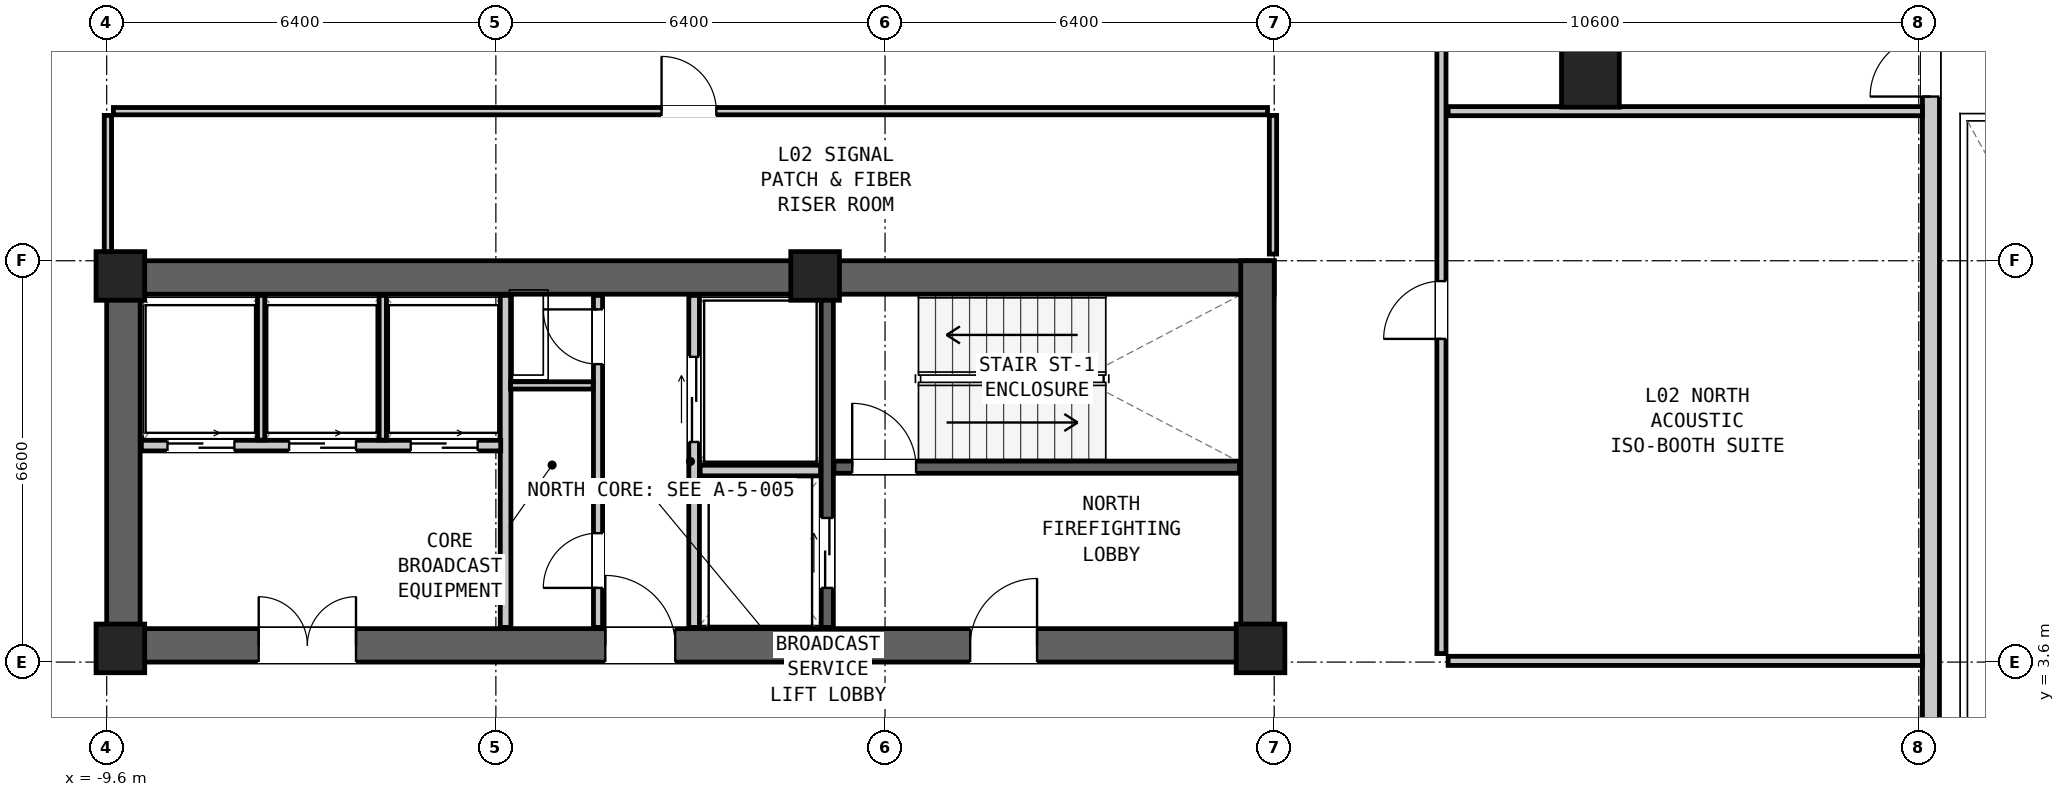
"""IFC4 building model, lengths in metres.
Left out: names, types, materials, properties, quantities, classifications, styles, units other than length and angle.
Written with IfcOpenShell. Run it as: python <this file> out.ifc"""

import sys

from ifc_helpers import new_model, si_unit, direction, frame, frame_2d, origin, origin_2d, place, context, subcontext, project, spatial, rectangle, hollow_rectangle, extrude, element, fill, save


model = new_model("IFC4")
c1 = context("Model", 3, precision=1e-05, world=origin(), true_north=direction((0.0, 1.0)))
c2 = subcontext(c1, "Body", "Model", "MODEL_VIEW")
j1 = project(units=[si_unit("LENGTHUNIT", "METRE"), si_unit("PLANEANGLEUNIT", "RADIAN")], contexts=[c1])
p1 = place(None, origin())
s1 = spatial("IfcSite", under=j1, at=p1, CompositionType="ELEMENT")
p2 = place(p1, origin())
s2 = spatial("IfcBuilding", under=s1, at=p2, CompositionType="ELEMENT")
p3 = place(p2, frame((0.0, 0.0, 9.3)))
s3 = spatial("IfcBuildingStorey", under=s2, at=p3, CompositionType="ELEMENT", Elevation=9.3)
p4 = place(p3, frame((-9.6, 9.925, 0.0), z_axis=(0.0, 0.0, 1.0), x_axis=(1.0, 0.0, 0.0)))
e1 = element("IfcWall", 1, at=p4, inside=s3, PredefinedType="SHEAR", context=c2, shape_type="SweptSolid", body=[
    extrude(rectangle(XDim=19.2, YDim=0.55, at=frame_2d((9.6, 0.0))), origin(), (0.0, 0.0, 1.0), 4.2),
])
p5 = place(p3, frame((-9.6, 3.875, 0.0), z_axis=(0.0, 0.0, 1.0), x_axis=(1.0, 0.0, 0.0)))
e2 = element("IfcWall", 2, at=p5, inside=s3, PredefinedType="SHEAR", context=c2, shape_type="SweptSolid", body=[
    extrude(rectangle(XDim=19.2, YDim=0.55, at=frame_2d((9.6, 0.0))), origin(), (0.0, 0.0, 1.0), 4.2),
])
p6 = place(p5, frame((14.2, 0.0, 0.0)))
e3 = element("IfcOpeningElement", 3, at=p6, cuts=e2, PredefinedType="OPENING", context=c2, shape_type="SweptSolid", body=[
    extrude(rectangle(XDim=1.1, YDim=2.08, at=frame_2d((0.55, 1.04))), frame((0.0, 0.287, 0.0), z_axis=(0.0, -1.0, 0.0), x_axis=(1.0, 0.0, 0.0)), (0.0, 0.0, 1.0), 0.574),
])
p7 = place(p5, frame((8.2, 0.0, 0.0)))
e4 = element("IfcOpeningElement", 4, at=p7, cuts=e2, PredefinedType="OPENING", context=c2, shape_type="SweptSolid", body=[
    extrude(rectangle(XDim=1.15, YDim=2.1, at=frame_2d((0.575, 1.05))), frame((0.0, 0.287, 0.0), z_axis=(0.0, -1.0, 0.0), x_axis=(1.0, 0.0, 0.0)), (0.0, 0.0, 1.0), 0.574),
])
p8 = place(p5, frame((2.5, 0.0, 0.0)))
e5 = element("IfcOpeningElement", 5, at=p8, cuts=e2, PredefinedType="OPENING", context=c2, shape_type="SweptSolid", body=[
    extrude(rectangle(XDim=1.6, YDim=2.12, at=frame_2d((0.8, 1.06))), frame((0.0, 0.287, 0.0), z_axis=(0.0, -1.0, 0.0), x_axis=(1.0, 0.0, 0.0)), (0.0, 0.0, 1.0), 0.574),
])
for number, where, z_axis, x_axis in (
    (6, (-9.325, 3.6, 0.0), (0.0, 0.0, 1.0), (0.0, 1.0, 0.0)),
    (7, (9.325, 3.6, 0.0), (0.0, 0.0, 1.0), (0.0, 1.0, 0.0)),
):
    element("IfcWall", number, at=place(p3, frame(where, z_axis=z_axis, x_axis=x_axis)), inside=s3, PredefinedType="SHEAR", context=c2, shape_type="SweptSolid", body=[
        extrude(rectangle(XDim=6.6, YDim=0.55, at=frame_2d((3.3, 0.0))), origin(), (0.0, 0.0, 1.0), 4.2),
    ])
p9 = place(p3, frame((14.8, 13.2, 0.0), z_axis=(0.0, 0.0, 1.0), x_axis=(1.0, 0.0, 0.0)))
e8 = element("IfcColumn", 8, at=p9, inside=s3, PredefinedType="COLUMN", context=c2, shape_type="SweptSolid", body=[
    extrude(hollow_rectangle(XDim=0.95, YDim=0.95, WallThickness=0.06, at=origin_2d()), origin(), (0.0, 0.0, 1.0), 4.2),
])
for number, where, z_axis, x_axis in (
    (9, (-9.375, 9.95, 0.0), (0.0, 0.0, 1.0), (1.0, 0.0, 0.0)),
    (10, (2.05, 9.95, 0.0), (0.0, 0.0, 1.0), (1.0, 0.0, 0.0)),
    (11, (-9.375, 3.825, 0.0), (0.0, 0.0, 1.0), (1.0, 0.0, 0.0)),
    (12, (9.375, 3.825, 0.0), (0.0, 0.0, 1.0), (1.0, 0.0, 0.0)),
):
    element("IfcColumn", number, at=place(p3, frame(where, z_axis=z_axis, x_axis=x_axis)), inside=s3, PredefinedType="COLUMN", context=c2, shape_type="SweptSolid", body=[
        extrude(rectangle(XDim=0.8, YDim=0.8, at=origin_2d()), origin(), (0.0, 0.0, 1.0), 4.2),
    ])
p10 = place(p3, frame((2.36, 6.805, 0.0), z_axis=(0.0, 0.0, 1.0), x_axis=(1.0, 0.0, 0.0)))
e13 = element("IfcWall", 13, at=p10, inside=s3, PredefinedType="SHEAR", context=c2, shape_type="SweptSolid", body=[
    extrude(rectangle(XDim=6.67, YDim=0.2, at=frame_2d((3.335, 0.0))), origin(), (0.0, 0.0, 1.0), 3.88),
])
p11 = place(p10, frame((0.3, 0.0, 0.0)))
e14 = element("IfcOpeningElement", 14, at=p11, cuts=e13, PredefinedType="OPENING", context=c2, shape_type="SweptSolid", body=[
    extrude(rectangle(XDim=1.05, YDim=2.08, at=frame_2d((0.525, 1.04))), frame((0.0, 0.112, 0.0), z_axis=(0.0, -1.0, 0.0), x_axis=(1.0, 0.0, 0.0)), (0.0, 0.0, 1.0), 0.224),
])
p12 = place(p3, frame((2.25, 4.17, 0.0), z_axis=(0.0, 0.0, 1.0), x_axis=(0.0, 1.0, 0.0)))
e15 = element("IfcWall", 15, at=p12, inside=s3, PredefinedType="SHEAR", context=c2, shape_type="SweptSolid", body=[
    extrude(rectangle(XDim=5.46, YDim=0.2, at=frame_2d((2.73, 0.0))), origin(), (0.0, 0.0, 1.0), 3.88),
])
p13 = place(p12, frame((0.65, 0.0, 0.0)))
e16 = element("IfcOpeningElement", 16, at=p13, cuts=e15, PredefinedType="OPENING", context=c2, shape_type="SweptSolid", body=[
    extrude(rectangle(XDim=1.15, YDim=2.08, at=frame_2d((0.575, 1.04))), frame((0.0, 0.112, 0.0), z_axis=(0.0, -1.0, 0.0), x_axis=(1.0, 0.0, 0.0)), (0.0, 0.0, 1.0), 0.224),
])
p14 = place(p3, frame((0.06, 4.17, 0.0), z_axis=(0.0, 0.0, 1.0), x_axis=(0.0, 1.0, 0.0)))
e17 = element("IfcWall", 17, at=p14, inside=s3, PredefinedType="PARTITIONING", context=c2, shape_type="SweptSolid", body=[
    extrude(rectangle(XDim=5.46, YDim=0.175, at=frame_2d((2.73, 0.0))), origin(), (0.0, 0.0, 1.0), 3.88),
])
p15 = place(p14, frame((3.05, 0.0, 0.0)))
e18 = element("IfcOpeningElement", 18, at=p15, cuts=e17, PredefinedType="OPENING", context=c2, shape_type="SweptSolid", body=[
    extrude(rectangle(XDim=1.4, YDim=2.12, at=frame_2d((0.7, 1.06))), frame((0.0, 0.1, 0.0), z_axis=(0.0, -1.0, 0.0), x_axis=(1.0, 0.0, 0.0)), (0.0, 0.0, 1.0), 0.199),
])
p16 = place(p3, frame((0.16, 6.75, 0.0), z_axis=(0.0, 0.0, 1.0), x_axis=(1.0, 0.0, 0.0)))
e19 = element("IfcWall", 19, at=p16, inside=s3, PredefinedType="PARTITIONING", context=c2, shape_type="SweptSolid", body=[
    extrude(rectangle(XDim=1.98, YDim=0.175, at=frame_2d((0.99, 0.0))), origin(), (0.0, 0.0, 1.0), 3.88),
])
p17 = place(p3, frame((-3.04, 4.17, 0.0), z_axis=(0.0, 0.0, 1.0), x_axis=(0.0, 1.0, 0.0)))
e20 = element("IfcWall", 20, at=p17, inside=s3, PredefinedType="PARTITIONING", context=c2, shape_type="SweptSolid", body=[
    extrude(rectangle(XDim=5.46, YDim=0.175, at=frame_2d((2.73, 0.0))), origin(), (0.0, 0.0, 1.0), 3.88),
])
p18 = place(p3, frame((-1.52, 4.17, 0.0), z_axis=(0.0, 0.0, 1.0), x_axis=(0.0, 1.0, 0.0)))
e21 = element("IfcWall", 21, at=p18, inside=s3, PredefinedType="PARTITIONING", context=c2, shape_type="SweptSolid", body=[
    extrude(rectangle(XDim=5.46, YDim=0.15, at=frame_2d((2.73, 0.0))), origin(), (0.0, 0.0, 1.0), 3.88),
])
p19 = place(p18, frame((4.33, 0.0, 0.0)))
e22 = element("IfcOpeningElement", 22, at=p19, cuts=e21, PredefinedType="OPENING", context=c2, shape_type="SweptSolid", body=[
    extrude(rectangle(XDim=0.9, YDim=2.05, at=frame_2d((0.45, 1.025))), frame((0.0, 0.087, 0.0), z_axis=(0.0, -1.0, 0.0), x_axis=(1.0, 0.0, 0.0)), (0.0, 0.0, 1.0), 0.174),
])
p20 = place(p18, frame((0.65, 0.0, 0.0)))
e23 = element("IfcOpeningElement", 23, at=p20, cuts=e21, PredefinedType="OPENING", context=c2, shape_type="SweptSolid", body=[
    extrude(rectangle(XDim=0.9, YDim=2.05, at=frame_2d((0.45, 1.025))), frame((0.0, 0.087, 0.0), z_axis=(0.0, -1.0, 0.0), x_axis=(1.0, 0.0, 0.0)), (0.0, 0.0, 1.0), 0.174),
])
p21 = place(p3, frame((-2.96, 8.15, 0.0), z_axis=(0.0, 0.0, 1.0), x_axis=(1.0, 0.0, 0.0)))
e24 = element("IfcWall", 24, at=p21, inside=s3, PredefinedType="PARTITIONING", context=c2, shape_type="SweptSolid", body=[
    extrude(rectangle(XDim=1.36, YDim=0.12, at=frame_2d((0.68, 0.0))), origin(), (0.0, 0.0, 1.0), 3.88),
])
p22 = place(p3, frame((-9.03, 7.16, 0.0), z_axis=(0.0, 0.0, 1.0), x_axis=(1.0, 0.0, 0.0)))
e25 = element("IfcWall", 25, at=p22, inside=s3, PredefinedType="PARTITIONING", context=c2, shape_type="SweptSolid", body=[
    extrude(rectangle(XDim=5.91, YDim=0.175, at=frame_2d((2.955, 0.0))), origin(), (0.0, 0.0, 1.0), 3.88),
])
p23 = place(p22, frame((0.43, 0.0, 0.0)))
e26 = element("IfcOpeningElement", 26, at=p23, cuts=e25, PredefinedType="OPENING", context=c2, shape_type="SweptSolid", body=[
    extrude(rectangle(XDim=1.1, YDim=2.06, at=frame_2d((0.55, 1.03))), frame((0.0, 0.1, 0.0), z_axis=(0.0, -1.0, 0.0), x_axis=(1.0, 0.0, 0.0)), (0.0, 0.0, 1.0), 0.199),
])
p24 = place(p22, frame((2.43, 0.0, 0.0)))
e27 = element("IfcOpeningElement", 27, at=p24, cuts=e25, PredefinedType="OPENING", context=c2, shape_type="SweptSolid", body=[
    extrude(rectangle(XDim=1.1, YDim=2.06, at=frame_2d((0.55, 1.03))), frame((0.0, 0.1, 0.0), z_axis=(0.0, -1.0, 0.0), x_axis=(1.0, 0.0, 0.0)), (0.0, 0.0, 1.0), 0.199),
])
p25 = place(p22, frame((4.43, 0.0, 0.0)))
e28 = element("IfcOpeningElement", 28, at=p25, cuts=e25, PredefinedType="OPENING", context=c2, shape_type="SweptSolid", body=[
    extrude(rectangle(XDim=1.1, YDim=2.06, at=frame_2d((0.55, 1.03))), frame((0.0, 0.1, 0.0), z_axis=(0.0, -1.0, 0.0), x_axis=(1.0, 0.0, 0.0)), (0.0, 0.0, 1.0), 0.199),
])
for number, where, z_axis, x_axis in (
    (29, (-7.06, 7.25, 0.0), (0.0, 0.0, 1.0), (0.0, 1.0, 0.0)),
    (30, (-5.06, 7.25, 0.0), (0.0, 0.0, 1.0), (0.0, 1.0, 0.0)),
):
    element("IfcWall", number, at=place(p3, frame(where, z_axis=z_axis, x_axis=x_axis)), inside=s3, PredefinedType="PARTITIONING", context=c2, shape_type="SweptSolid", body=[
        extrude(rectangle(XDim=2.38, YDim=0.12, at=frame_2d((1.19, 0.0))), origin(), (0.0, 0.0, 1.0), 3.88),
    ])
p26 = place(p3, frame((20.4, -25.74, 0.0), z_axis=(0.0, 0.0, 1.0), x_axis=(0.0, 1.0, 0.0)))
e31 = element("IfcWall", 31, at=p26, inside=s3, PredefinedType="MOVABLE", context=c2, shape_type="SweptSolid", body=[
    extrude(rectangle(XDim=51.48, YDim=0.28, at=frame_2d((25.74, 0.0))), origin(), (0.0, 0.0, 1.0), 2.933),
])
p27 = place(p26, frame((11.149, 0.0, 0.0)))
e32 = element("IfcOpeningElement", 32, at=p27, cuts=e31, PredefinedType="OPENING", context=c2, shape_type="SweptSolid", body=[
    extrude(rectangle(XDim=2.0, YDim=2.14, at=frame_2d((1.0, 1.07))), frame((0.0, 0.152, 0.0), z_axis=(0.0, -1.0, 0.0), x_axis=(1.0, 0.0, 0.0)), (0.0, 0.0, 1.0), 0.304),
])
p28 = place(p26, frame((38.64, 0.0, 0.0)))
e33 = element("IfcOpeningElement", 33, at=p28, cuts=e31, PredefinedType="OPENING", context=c2, shape_type="SweptSolid", body=[
    extrude(rectangle(XDim=2.0, YDim=2.14, at=frame_2d((1.0, 1.07))), frame((0.0, 0.152, 0.0), z_axis=(0.0, -1.0, 0.0), x_axis=(1.0, 0.0, 0.0)), (0.0, 0.0, 1.0), 0.304),
])
p29 = place(p3, frame((12.35, 3.74, 0.0), z_axis=(0.0, 0.0, 1.0), x_axis=(0.0, 1.0, 0.0)))
e34 = element("IfcWall", 34, at=p29, inside=s3, PredefinedType="PARTITIONING", context=c2, shape_type="SweptSolid", body=[
    extrude(rectangle(XDim=11.3, YDim=0.15, at=frame_2d((5.65, 0.0))), origin(), (0.0, 0.0, 1.0), 3.88),
])
p30 = place(p29, frame((5.175, 0.0, 0.0)))
e35 = element("IfcOpeningElement", 35, at=p30, cuts=e34, PredefinedType="OPENING", context=c2, shape_type="SweptSolid", body=[
    extrude(rectangle(XDim=0.95, YDim=2.1, at=frame_2d((0.475, 1.05))), frame((0.0, 0.087, 0.0), z_axis=(0.0, -1.0, 0.0), x_axis=(1.0, 0.0, 0.0)), (0.0, 0.0, 1.0), 0.174),
])
p31 = place(p3, frame((12.46, 3.62, 0.0), z_axis=(0.0, 0.0, 1.0), x_axis=(1.0, 0.0, 0.0)))
e36 = element("IfcWall", 36, at=p31, inside=s3, PredefinedType="PARTITIONING", context=c2, shape_type="SweptSolid", body=[
    extrude(rectangle(XDim=7.8, YDim=0.15, at=frame_2d((3.9, 0.0))), origin(), (0.0, 0.0, 1.0), 2.742),
])
p32 = place(p3, frame((-9.49, 12.66, 0.0), z_axis=(0.0, 0.0, 1.0), x_axis=(1.0, 0.0, 0.0)))
e37 = element("IfcWall", 37, at=p32, inside=s3, PredefinedType="PARTITIONING", context=c2, shape_type="SweptSolid", body=[
    extrude(rectangle(XDim=18.98, YDim=0.12, at=frame_2d((9.49, 0.0))), origin(), (0.0, 0.0, 1.0), 3.88),
])
p33 = place(p32, frame((9.015, 0.0, 0.0)))
e38 = element("IfcOpeningElement", 38, at=p33, cuts=e37, PredefinedType="OPENING", context=c2, shape_type="SweptSolid", body=[
    extrude(rectangle(XDim=0.9, YDim=2.05, at=frame_2d((0.45, 1.025))), frame((0.0, 0.072, 0.0), z_axis=(0.0, -1.0, 0.0), x_axis=(1.0, 0.0, 0.0)), (0.0, 0.0, 1.0), 0.144),
])
for number, where, z_axis, x_axis in (
    (39, (-9.58, 10.31, 0.0), (0.0, 0.0, 1.0), (0.0, 1.0, 0.0)),
    (40, (9.58, 10.31, 0.0), (0.0, 0.0, 1.0), (0.0, 1.0, 0.0)),
):
    element("IfcWall", number, at=place(p3, frame(where, z_axis=z_axis, x_axis=x_axis)), inside=s3, PredefinedType="PARTITIONING", context=c2, shape_type="SweptSolid", body=[
        extrude(rectangle(XDim=2.28, YDim=0.12, at=frame_2d((1.14, 0.0))), origin(), (0.0, 0.0, 1.0), 3.88),
    ])
p34 = place(p3, frame((12.46, 12.66, 0.0), z_axis=(0.0, 0.0, 1.0), x_axis=(1.0, 0.0, 0.0)))
e41 = element("IfcWall", 41, at=p34, inside=s3, PredefinedType="PARTITIONING", context=c2, shape_type="SweptSolid", body=[
    extrude(rectangle(XDim=7.8, YDim=0.15, at=frame_2d((3.9, 0.0))), origin(), (0.0, 0.0, 1.0), 3.88),
])
p35 = place(p11, origin())
e42 = element("IfcDoor", 42, at=p35, inside=s3, OperationType="SINGLE_SWING_LEFT", PredefinedType="DOOR", context=c2, shape_type="SweptSolid", body=[
    extrude(rectangle(XDim=1.05, YDim=2.08, at=frame_2d((0.525, 1.04))), frame((0.0, 0.025, 0.0), z_axis=(0.0, -1.0, 0.0), x_axis=(1.0, 0.0, 0.0)), (0.0, 0.0, 1.0), 0.05),
])
fill(e14, e42)
p36 = place(p6, origin())
e43 = element("IfcDoor", 43, at=p36, inside=s3, OperationType="SINGLE_SWING_RIGHT", PredefinedType="DOOR", context=c2, shape_type="SweptSolid", body=[
    extrude(rectangle(XDim=1.1, YDim=2.08, at=frame_2d((0.55, 1.04))), frame((0.0, 0.025, 0.0), z_axis=(0.0, -1.0, 0.0), x_axis=(1.0, 0.0, 0.0)), (0.0, 0.0, 1.0), 0.05),
])
fill(e3, e43)
p37 = place(p13, origin())
e44 = element("IfcDoor", 44, at=p37, inside=s3, OperationType="DOUBLE_DOOR_SLIDING", PredefinedType="DOOR", context=c2, shape_type="SweptSolid", body=[
    extrude(rectangle(XDim=1.15, YDim=2.08, at=frame_2d((0.575, 1.04))), frame((0.0, 0.025, 0.0), z_axis=(0.0, -1.0, 0.0), x_axis=(1.0, 0.0, 0.0)), (0.0, 0.0, 1.0), 0.05),
])
fill(e16, e44)
p38 = place(p15, origin())
e45 = element("IfcDoor", 45, at=p38, inside=s3, OperationType="DOUBLE_DOOR_SLIDING", PredefinedType="DOOR", context=c2, shape_type="SweptSolid", body=[
    extrude(rectangle(XDim=1.4, YDim=2.12, at=frame_2d((0.7, 1.06))), frame((0.0, 0.025, 0.0), z_axis=(0.0, -1.0, 0.0), x_axis=(1.0, 0.0, 0.0)), (0.0, 0.0, 1.0), 0.05),
])
fill(e18, e45)
p39 = place(p7, origin())
e46 = element("IfcDoor", 46, at=p39, inside=s3, OperationType="SINGLE_SWING_LEFT", PredefinedType="DOOR", context=c2, shape_type="SweptSolid", body=[
    extrude(rectangle(XDim=1.15, YDim=2.1, at=frame_2d((0.575, 1.05))), frame((0.0, 0.025, 0.0), z_axis=(0.0, -1.0, 0.0), x_axis=(1.0, 0.0, 0.0)), (0.0, 0.0, 1.0), 0.05),
])
fill(e4, e46)
p40 = place(p19, origin())
e47 = element("IfcDoor", 47, at=p40, inside=s3, OperationType="SINGLE_SWING_RIGHT", PredefinedType="DOOR", context=c2, shape_type="SweptSolid", body=[
    extrude(rectangle(XDim=0.9, YDim=2.05, at=frame_2d((0.45, 1.025))), frame((0.0, 0.025, 0.0), z_axis=(0.0, -1.0, 0.0), x_axis=(1.0, 0.0, 0.0)), (0.0, 0.0, 1.0), 0.05),
])
fill(e22, e47)
p41 = place(p20, origin())
e48 = element("IfcDoor", 48, at=p41, inside=s3, OperationType="SINGLE_SWING_LEFT", PredefinedType="DOOR", context=c2, shape_type="SweptSolid", body=[
    extrude(rectangle(XDim=0.9, YDim=2.05, at=frame_2d((0.45, 1.025))), frame((0.0, 0.025, 0.0), z_axis=(0.0, -1.0, 0.0), x_axis=(1.0, 0.0, 0.0)), (0.0, 0.0, 1.0), 0.05),
])
fill(e23, e48)
p42 = place(p23, origin())
e49 = element("IfcDoor", 49, at=p42, inside=s3, OperationType="DOUBLE_DOOR_SLIDING", PredefinedType="DOOR", context=c2, shape_type="SweptSolid", body=[
    extrude(rectangle(XDim=1.1, YDim=2.06, at=frame_2d((0.55, 1.03))), frame((0.0, 0.025, 0.0), z_axis=(0.0, -1.0, 0.0), x_axis=(1.0, 0.0, 0.0)), (0.0, 0.0, 1.0), 0.05),
])
fill(e26, e49)
p43 = place(p24, origin())
e50 = element("IfcDoor", 50, at=p43, inside=s3, OperationType="DOUBLE_DOOR_SLIDING", PredefinedType="DOOR", context=c2, shape_type="SweptSolid", body=[
    extrude(rectangle(XDim=1.1, YDim=2.06, at=frame_2d((0.55, 1.03))), frame((0.0, 0.025, 0.0), z_axis=(0.0, -1.0, 0.0), x_axis=(1.0, 0.0, 0.0)), (0.0, 0.0, 1.0), 0.05),
])
fill(e27, e50)
p44 = place(p25, origin())
e51 = element("IfcDoor", 51, at=p44, inside=s3, OperationType="DOUBLE_DOOR_SLIDING", PredefinedType="DOOR", context=c2, shape_type="SweptSolid", body=[
    extrude(rectangle(XDim=1.1, YDim=2.06, at=frame_2d((0.55, 1.03))), frame((0.0, 0.025, 0.0), z_axis=(0.0, -1.0, 0.0), x_axis=(1.0, 0.0, 0.0)), (0.0, 0.0, 1.0), 0.05),
])
fill(e28, e51)
p45 = place(p8, origin())
e52 = element("IfcDoor", 52, at=p45, inside=s3, OperationType="DOUBLE_DOOR_SINGLE_SWING", PredefinedType="DOOR", context=c2, shape_type="SweptSolid", body=[
    extrude(rectangle(XDim=1.6, YDim=2.12, at=frame_2d((0.8, 1.06))), frame((0.0, 0.025, 0.0), z_axis=(0.0, -1.0, 0.0), x_axis=(1.0, 0.0, 0.0)), (0.0, 0.0, 1.0), 0.05),
])
fill(e5, e52)
p46 = place(p28, origin())
e53 = element("IfcDoor", 53, at=p46, inside=s3, OperationType="DOUBLE_DOOR_SINGLE_SWING", PredefinedType="DOOR", context=c2, shape_type="SweptSolid", body=[
    extrude(rectangle(XDim=2.0, YDim=2.14, at=frame_2d((1.0, 1.07))), frame((0.0, 0.025, 0.0), z_axis=(0.0, -1.0, 0.0), x_axis=(1.0, 0.0, 0.0)), (0.0, 0.0, 1.0), 0.05),
])
fill(e33, e53)
p47 = place(p30, origin())
e54 = element("IfcDoor", 54, at=p47, inside=s3, OperationType="SINGLE_SWING_LEFT", PredefinedType="DOOR", context=c2, shape_type="SweptSolid", body=[
    extrude(rectangle(XDim=0.95, YDim=2.1, at=frame_2d((0.475, 1.05))), frame((0.0, 0.025, 0.0), z_axis=(0.0, -1.0, 0.0), x_axis=(1.0, 0.0, 0.0)), (0.0, 0.0, 1.0), 0.05),
])
fill(e35, e54)
p48 = place(p33, origin())
e55 = element("IfcDoor", 55, at=p48, inside=s3, OperationType="SINGLE_SWING_LEFT", PredefinedType="DOOR", context=c2, shape_type="SweptSolid", body=[
    extrude(rectangle(XDim=0.9, YDim=2.05, at=frame_2d((0.45, 1.025))), frame((0.0, 0.025, 0.0), z_axis=(0.0, -1.0, 0.0), x_axis=(1.0, 0.0, 0.0)), (0.0, 0.0, 1.0), 0.05),
])
fill(e38, e55)
save(model, sys.argv[1])
